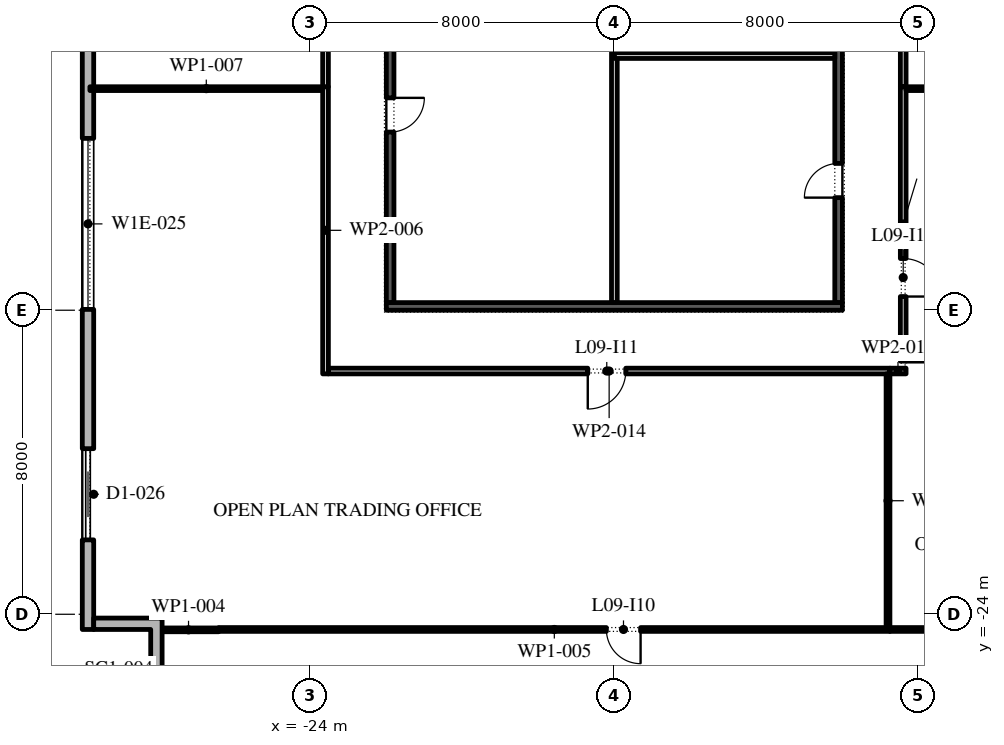
"""IFC4 building model, lengths in metres.
Left out: names, types, materials, properties, quantities, classifications, styles, units other than length and angle.
Written with IfcOpenShell. Run it as: python <this file> out.ifc"""

import sys

from ifc_helpers import new_model, si_unit, direction, frame, frame_2d, origin, place, context, subcontext, project, spatial, polyline, rectangle, outline, extrude, element, fill, save


model = new_model("IFC4")
c1 = context("Model", 3, precision=1e-05, world=origin(), true_north=direction((0.0, 1.0)))
c2 = subcontext(c1, "Body", "Model", "MODEL_VIEW")
j1 = project(units=[si_unit("LENGTHUNIT", "METRE"), si_unit("PLANEANGLEUNIT", "RADIAN")], contexts=[c1])
p1 = place(None, origin())
s1 = spatial("IfcSite", under=j1, at=p1, CompositionType="ELEMENT")
p2 = place(p1, origin())
s2 = spatial("IfcBuilding", under=s1, at=p2, CompositionType="ELEMENT")
p3 = place(p2, frame((0.0, 0.0, 48.0)))
s3 = spatial("IfcBuildingStorey", under=s2, at=p3, CompositionType="ELEMENT", Elevation=48.0)
p4 = place(p3, frame((-29.85, 25.1, 0.0), z_axis=(0.0, 0.0, 1.0), x_axis=(0.0, -1.0, 0.0)))
e1 = element("IfcWall", 1, at=p4, inside=s3, PredefinedType="STANDARD", context=c2, shape_type="SweptSolid", body=[
    extrude(rectangle(XDim=49.5, YDim=0.3, at=frame_2d((24.75, 0.0))), origin(), (0.0, 0.0, 1.0), 4.0),
])
p5 = place(p4, frame((1.157, 0.0, 0.45)))
e2 = element("IfcOpeningElement", 2, at=p5, cuts=e1, PredefinedType="OPENING", context=c2, shape_type="SweptSolid", body=[
    extrude(rectangle(XDim=4.5, YDim=2.875, at=frame_2d((2.25, 1.438))), frame((0.0, 0.16, 0.0), z_axis=(0.0, -1.0, 0.0), x_axis=(1.0, 0.0, 0.0)), (0.0, 0.0, 1.0), 0.32),
])
p6 = place(p4, frame((8.121, 0.0, 0.45)))
e3 = element("IfcOpeningElement", 3, at=p6, cuts=e1, PredefinedType="OPENING", context=c2, shape_type="SweptSolid", body=[
    extrude(rectangle(XDim=4.5, YDim=3.05, at=frame_2d((2.25, 1.525))), frame((0.0, 0.16, 0.0), z_axis=(0.0, -1.0, 0.0), x_axis=(1.0, 0.0, 0.0)), (0.0, 0.0, 1.0), 0.32),
])
p7 = place(p4, frame((16.286, 0.0, 0.0)))
e4 = element("IfcOpeningElement", 4, at=p7, cuts=e1, PredefinedType="OPENING", context=c2, shape_type="SweptSolid", body=[
    extrude(rectangle(XDim=2.4, YDim=3.325, at=frame_2d((1.2, 1.663))), frame((0.0, 0.16, 0.0), z_axis=(0.0, -1.0, 0.0), x_axis=(1.0, 0.0, 0.0)), (0.0, 0.0, 1.0), 0.32),
])
p8 = place(p4, frame((22.35, 0.0, 0.45)))
e5 = element("IfcOpeningElement", 5, at=p8, cuts=e1, PredefinedType="OPENING", context=c2, shape_type="SweptSolid", body=[
    extrude(rectangle(XDim=4.5, YDim=2.875, at=frame_2d((2.25, 1.438))), frame((0.0, 0.16, 0.0), z_axis=(0.0, -1.0, 0.0), x_axis=(1.0, 0.0, 0.0)), (0.0, 0.0, 1.0), 0.32),
])
p9 = place(p4, frame((29.464, 0.0, 0.45)))
e6 = element("IfcOpeningElement", 6, at=p9, cuts=e1, PredefinedType="OPENING", context=c2, shape_type="SweptSolid", body=[
    extrude(rectangle(XDim=4.5, YDim=2.875, at=frame_2d((2.25, 1.438))), frame((0.0, 0.16, 0.0), z_axis=(0.0, -1.0, 0.0), x_axis=(1.0, 0.0, 0.0)), (0.0, 0.0, 1.0), 0.32),
])
p10 = place(p4, frame((36.579, 0.0, 0.45)))
e7 = element("IfcOpeningElement", 7, at=p10, cuts=e1, PredefinedType="OPENING", context=c2, shape_type="SweptSolid", body=[
    extrude(rectangle(XDim=4.5, YDim=2.825, at=frame_2d((2.25, 1.413))), frame((0.0, 0.16, 0.0), z_axis=(0.0, -1.0, 0.0), x_axis=(1.0, 0.0, 0.0)), (0.0, 0.0, 1.0), 0.32),
])
p11 = place(p4, frame((44.743, 0.0, 0.0)))
e8 = element("IfcOpeningElement", 8, at=p11, cuts=e1, PredefinedType="OPENING", context=c2, shape_type="SweptSolid", body=[
    extrude(rectangle(XDim=2.4, YDim=3.5, at=frame_2d((1.2, 1.75))), frame((0.0, 0.16, 0.0), z_axis=(0.0, -1.0, 0.0), x_axis=(1.0, 0.0, 0.0)), (0.0, 0.0, 1.0), 0.32),
])
p12 = place(p3, origin())
e9 = element("IfcWall", 9, at=p12, inside=s3, PredefinedType="STANDARD", context=c2, shape_type="SweptSolid", body=[
    extrude(outline(polyline([(-26.4, -26.2), (-28.2, -26.2), (-28.2, -24.4), (-29.7, -24.4), (-29.7, -24.1), (-27.9, -24.1), (-27.9, -25.9), (-26.1, -25.9), (-26.1, -28.0), (-26.4, -28.0), (-26.4, -26.2)])), origin(), (0.0, 0.0, 1.0), 4.0),
])
p13 = place(p3, frame((-21.9, -15.8, 0.0), z_axis=(0.0, 0.0, 1.0), x_axis=(0.0, 1.0, 0.0)))
e10 = element("IfcWall", 10, at=p13, inside=s3, PredefinedType="SHEAR", context=c2, shape_type="SweptSolid", body=[
    extrude(rectangle(XDim=13.05, YDim=0.2, at=frame_2d((6.525, 0.0))), origin(), (0.0, 0.0, 1.0), 4.0),
])
p14 = place(p13, frame((4.488, 0.0, 0.0)))
e11 = element("IfcOpeningElement", 11, at=p14, cuts=e10, PredefinedType="OPENING", context=c2, shape_type="SweptSolid", body=[
    extrude(rectangle(XDim=0.9, YDim=2.1, at=frame_2d((0.45, 1.05))), frame((0.0, 0.11, 0.0), z_axis=(0.0, -1.0, 0.0), x_axis=(1.0, 0.0, 0.0)), (0.0, 0.0, 1.0), 0.22),
])
p15 = place(p13, frame((11.038, 0.0, 0.0)))
e12 = element("IfcOpeningElement", 12, at=p15, cuts=e10, PredefinedType="OPENING", context=c2, shape_type="SweptSolid", body=[
    extrude(rectangle(XDim=1.0, YDim=2.1, at=frame_2d((0.5, 1.05))), frame((0.0, 0.11, 0.0), z_axis=(0.0, -1.0, 0.0), x_axis=(1.0, 0.0, 0.0)), (0.0, 0.0, 1.0), 0.22),
])
p16 = place(p3, frame((-10.1, -15.8, 0.0), z_axis=(0.0, 0.0, 1.0), x_axis=(0.0, 1.0, 0.0)))
e13 = element("IfcWall", 13, at=p16, inside=s3, PredefinedType="SHEAR", context=c2, shape_type="SweptSolid", body=[
    extrude(rectangle(XDim=13.05, YDim=0.2, at=frame_2d((6.525, 0.0))), origin(), (0.0, 0.0, 1.0), 4.0),
])
p17 = place(p16, frame((2.762, 0.0, 0.0)))
e14 = element("IfcOpeningElement", 14, at=p17, cuts=e13, PredefinedType="OPENING", context=c2, shape_type="SweptSolid", body=[
    extrude(rectangle(XDim=0.9, YDim=2.1, at=frame_2d((0.45, 1.05))), frame((0.0, 0.11, 0.0), z_axis=(0.0, -1.0, 0.0), x_axis=(1.0, 0.0, 0.0)), (0.0, 0.0, 1.0), 0.22),
])
p18 = place(p16, frame((9.363, 0.0, 0.0)))
e15 = element("IfcOpeningElement", 15, at=p18, cuts=e13, PredefinedType="OPENING", context=c2, shape_type="SweptSolid", body=[
    extrude(rectangle(XDim=0.9, YDim=2.1, at=frame_2d((0.45, 1.05))), frame((0.0, 0.11, 0.0), z_axis=(0.0, -1.0, 0.0), x_axis=(1.0, 0.0, 0.0)), (0.0, 0.0, 1.0), 0.22),
])
p19 = place(p3, frame((-22.0, -15.9, 0.0), z_axis=(0.0, 0.0, 1.0), x_axis=(1.0, 0.0, 0.0)))
e16 = element("IfcWall", 16, at=p19, inside=s3, PredefinedType="SHEAR", context=c2, shape_type="SweptSolid", body=[
    extrude(rectangle(XDim=12.0, YDim=0.2, at=frame_2d((6.0, 0.0))), origin(), (0.0, 0.0, 1.0), 4.0),
])
p20 = place(p3, frame((-16.0, -15.8, 0.0), z_axis=(0.0, 0.0, 1.0), x_axis=(0.0, 1.0, 0.0)))
e17 = element("IfcWall", 17, at=p20, inside=s3, PredefinedType="PARTITIONING", context=c2, shape_type="SweptSolid", body=[
    extrude(rectangle(XDim=13.05, YDim=0.15, at=frame_2d((6.525, 0.0))), origin(), (0.0, 0.0, 1.0), 4.0),
])
p21 = place(p20, frame((11.087, 0.0, 0.0)))
e18 = element("IfcOpeningElement", 18, at=p21, cuts=e17, PredefinedType="OPENING", context=c2, shape_type="SweptSolid", body=[
    extrude(rectangle(XDim=0.9, YDim=2.1, at=frame_2d((0.45, 1.05))), frame((0.0, 0.085, 0.0), z_axis=(0.0, -1.0, 0.0), x_axis=(1.0, 0.0, 0.0)), (0.0, 0.0, 1.0), 0.17),
])
p22 = place(p3, frame((-16.0, -9.3, 0.0), z_axis=(0.0, 0.0, 1.0), x_axis=(1.0, 0.0, 0.0)))
e19 = element("IfcWall", 19, at=p22, inside=s3, PredefinedType="PARTITIONING", context=c2, shape_type="SweptSolid", body=[
    extrude(rectangle(XDim=5.8, YDim=0.15, at=frame_2d((2.9, 0.0))), origin(), (0.0, 0.0, 1.0), 4.0),
])
p23 = place(p3, frame((-28.0, -24.41, 0.0), z_axis=(0.0, 0.0, 1.0), x_axis=(1.0, 0.0, 0.0)))
e20 = element("IfcWall", 20, at=p23, inside=s3, PredefinedType="PARTITIONING", context=c2, shape_type="SweptSolid", body=[
    extrude(rectangle(XDim=1.59, YDim=0.1, at=frame_2d((0.795, 0.0))), origin(), (0.0, 0.0, 1.0), 4.0),
])
p24 = place(p3, frame((-26.41, -24.4, 0.0), z_axis=(0.0, 0.0, 1.0), x_axis=(1.0, 0.0, 0.0)))
e21 = element("IfcWall", 21, at=p24, inside=s3, PredefinedType="PARTITIONING", context=c2, shape_type="SweptSolid", body=[
    extrude(rectangle(XDim=17.66, YDim=0.1, at=frame_2d((8.83, 0.0))), origin(), (0.0, 0.0, 1.0), 4.0),
])
p25 = place(p24, frame((10.2, 0.0, 0.0)))
e22 = element("IfcOpeningElement", 22, at=p25, cuts=e21, PredefinedType="OPENING", context=c2, shape_type="SweptSolid", body=[
    extrude(rectangle(XDim=0.9, YDim=2.1, at=frame_2d((0.45, 1.05))), frame((0.0, 0.06, 0.0), z_axis=(0.0, -1.0, 0.0), x_axis=(1.0, 0.0, 0.0)), (0.0, 0.0, 1.0), 0.12),
])
p26 = place(p3, frame((-23.6, -17.675, 0.0), z_axis=(0.0, 0.0, 1.0), x_axis=(0.0, 1.0, 0.0)))
e23 = element("IfcWall", 23, at=p26, inside=s3, PredefinedType="PARTITIONING", context=c2, shape_type="SweptSolid", body=[
    extrude(rectangle(XDim=7.555, YDim=0.15, at=frame_2d((3.777, 0.0))), origin(), (0.0, 0.0, 1.0), 4.0),
])
p27 = place(p3, frame((-23.675, -10.17, 0.0), z_axis=(0.0, 0.0, 1.0), x_axis=(-1.0, 0.0, 0.0)))
e24 = element("IfcWall", 24, at=p27, inside=s3, PredefinedType="PARTITIONING", context=c2, shape_type="SweptSolid", body=[
    extrude(rectangle(XDim=6.125, YDim=0.1, at=frame_2d((3.062, 0.0))), origin(), (0.0, 0.0, 1.0), 4.0),
])
p28 = place(p3, frame((-23.6, -10.12, 0.0), z_axis=(0.0, 0.0, 1.0), x_axis=(0.0, 1.0, 0.0)))
e25 = element("IfcWall", 25, at=p28, inside=s3, PredefinedType="PARTITIONING", context=c2, shape_type="SweptSolid", body=[
    extrude(rectangle(XDim=7.01, YDim=0.15, at=frame_2d((3.505, 0.0))), origin(), (0.0, 0.0, 1.0), 4.0),
])
p29 = place(p28, frame((2.41, 0.0, 0.0)))
e26 = element("IfcOpeningElement", 26, at=p29, cuts=e25, PredefinedType="OPENING", context=c2, shape_type="SweptSolid", body=[
    extrude(rectangle(XDim=1.0, YDim=2.1, at=frame_2d((0.5, 1.05))), frame((0.0, 0.085, 0.0), z_axis=(0.0, -1.0, 0.0), x_axis=(1.0, 0.0, 0.0)), (0.0, 0.0, 1.0), 0.17),
])
p30 = place(p3, frame((-8.75, -24.4, 0.0), z_axis=(0.0, 0.0, 1.0), x_axis=(1.0, 0.0, 0.0)))
e27 = element("IfcWall", 27, at=p30, inside=s3, PredefinedType="PARTITIONING", context=c2, shape_type="SweptSolid", body=[
    extrude(rectangle(XDim=10.2, YDim=0.1, at=frame_2d((5.1, 0.0))), origin(), (0.0, 0.0, 1.0), 4.0),
])
p31 = place(p3, frame((-8.75, -17.6, 0.0), z_axis=(0.0, 0.0, 1.0), x_axis=(-1.0, 0.0, 0.0)))
e28 = element("IfcWall", 28, at=p31, inside=s3, PredefinedType="PARTITIONING", context=c2, shape_type="SweptSolid", body=[
    extrude(rectangle(XDim=14.775, YDim=0.15, at=frame_2d((7.387, 0.0))), origin(), (0.0, 0.0, 1.0), 4.0),
])
p32 = place(p31, frame((6.95, 0.0, 0.0)))
e29 = element("IfcOpeningElement", 29, at=p32, cuts=e28, PredefinedType="OPENING", context=c2, shape_type="SweptSolid", body=[
    extrude(rectangle(XDim=1.0, YDim=2.1, at=frame_2d((0.5, 1.05))), frame((0.0, 0.085, 0.0), z_axis=(0.0, -1.0, 0.0), x_axis=(1.0, 0.0, 0.0)), (0.0, 0.0, 1.0), 0.17),
])
p33 = place(p3, frame((-8.8, -17.675, 0.0), z_axis=(0.0, 0.0, 1.0), x_axis=(0.0, -1.0, 0.0)))
e30 = element("IfcWall", 30, at=p33, inside=s3, PredefinedType="PARTITIONING", context=c2, shape_type="SweptSolid", body=[
    extrude(rectangle(XDim=6.675, YDim=0.1, at=frame_2d((3.337, 0.0))), origin(), (0.0, 0.0, 1.0), 4.0),
])
p34 = place(p3, frame((-8.325, -17.6, 0.0), z_axis=(0.0, 0.0, 1.0), x_axis=(-1.0, 0.0, 0.0)))
e31 = element("IfcWall", 31, at=p34, inside=s3, PredefinedType="PARTITIONING", context=c2, shape_type="SweptSolid", body=[
    extrude(rectangle(XDim=0.425, YDim=0.15, at=frame_2d((0.212, 0.0))), origin(), (0.0, 0.0, 1.0), 4.0),
])
p35 = place(p3, frame((-8.4, -10.12, 0.0), z_axis=(0.0, 0.0, 1.0), x_axis=(0.0, -1.0, 0.0)))
e32 = element("IfcWall", 32, at=p35, inside=s3, PredefinedType="PARTITIONING", context=c2, shape_type="SweptSolid", body=[
    extrude(rectangle(XDim=7.22, YDim=0.15, at=frame_2d((3.61, 0.0))), origin(), (0.0, 0.0, 1.0), 4.0),
])
p36 = place(p35, frame((4.52, 0.0, 0.0)))
e33 = element("IfcOpeningElement", 33, at=p36, cuts=e32, PredefinedType="OPENING", context=c2, shape_type="SweptSolid", body=[
    extrude(rectangle(XDim=1.0, YDim=2.1, at=frame_2d((0.5, 1.05))), frame((0.0, 0.085, 0.0), z_axis=(0.0, -1.0, 0.0), x_axis=(1.0, 0.0, 0.0)), (0.0, 0.0, 1.0), 0.17),
])
p37 = place(p3, frame((-8.4, -4.925, 0.0), z_axis=(0.0, 0.0, 1.0), x_axis=(0.0, -1.0, 0.0)))
e34 = element("IfcWall", 34, at=p37, inside=s3, PredefinedType="PARTITIONING", context=c2, shape_type="SweptSolid", body=[
    extrude(rectangle(XDim=5.195, YDim=0.15, at=frame_2d((2.598, 0.0))), origin(), (0.0, 0.0, 1.0), 4.0),
])
p38 = place(p3, frame((1.55, -17.29, 0.0), z_axis=(0.0, 0.0, 1.0), x_axis=(-1.0, 0.0, 0.0)))
e35 = element("IfcWall", 35, at=p38, inside=s3, PredefinedType="PARTITIONING", context=c2, shape_type="SweptSolid", body=[
    extrude(rectangle(XDim=9.875, YDim=0.1, at=frame_2d((4.938, 0.0))), origin(), (0.0, 0.0, 1.0), 4.0),
])
p39 = place(p38, frame((5.6, 0.0, 0.0)))
e36 = element("IfcOpeningElement", 36, at=p39, cuts=e35, PredefinedType="OPENING", context=c2, shape_type="SweptSolid", body=[
    extrude(rectangle(XDim=0.9, YDim=2.1, at=frame_2d((0.45, 1.05))), frame((0.0, 0.06, 0.0), z_axis=(0.0, -1.0, 0.0), x_axis=(1.0, 0.0, 0.0)), (0.0, 0.0, 1.0), 0.12),
])
p40 = place(p3, frame((8.325, -10.17, 0.0), z_axis=(0.0, 0.0, 1.0), x_axis=(-1.0, 0.0, 0.0)))
e37 = element("IfcWall", 37, at=p40, inside=s3, PredefinedType="PARTITIONING", context=c2, shape_type="SweptSolid", body=[
    extrude(rectangle(XDim=16.65, YDim=0.1, at=frame_2d((8.325, 0.0))), origin(), (0.0, 0.0, 1.0), 4.0),
])
p41 = place(p10, origin())
e38 = element("IfcWindow", 38, at=p41, inside=s3, PartitioningType="DOUBLE_PANEL_VERTICAL", PredefinedType="WINDOW", context=c2, shape_type="SweptSolid", body=[
    extrude(rectangle(XDim=4.5, YDim=2.825, at=frame_2d((2.25, 1.413))), frame((0.0, 0.03, 0.0), z_axis=(0.0, -1.0, 0.0), x_axis=(1.0, 0.0, 0.0)), (0.0, 0.0, 1.0), 0.06),
])
fill(e7, e38)
p42 = place(p11, origin())
e39 = element("IfcDoor", 39, at=p42, inside=s3, OperationType="DOUBLE_DOOR_SLIDING", PredefinedType="DOOR", context=c2, shape_type="SweptSolid", body=[
    extrude(rectangle(XDim=2.4, YDim=3.5, at=frame_2d((1.2, 1.75))), frame((0.0, 0.025, 0.0), z_axis=(0.0, -1.0, 0.0), x_axis=(1.0, 0.0, 0.0)), (0.0, 0.0, 1.0), 0.05),
])
fill(e8, e39)
p43 = place(p14, frame((0.9, -0.15, 0.0), z_axis=(0.0, 0.0, 1.0), x_axis=(-1.0, 0.0, 0.0)))
e40 = element("IfcDoor", 40, at=p43, inside=s3, OperationType="SINGLE_SWING_RIGHT", PredefinedType="DOOR", context=c2, shape_type="SweptSolid", body=[
    extrude(rectangle(XDim=0.9, YDim=2.1, at=frame_2d((0.45, 1.05))), frame((0.0, -0.05, 0.0), z_axis=(0.0, -1.0, 0.0), x_axis=(1.0, 0.0, 0.0)), (0.0, 0.0, 1.0), 0.05),
])
fill(e11, e40)
p44 = place(p17, origin())
e41 = element("IfcDoor", 41, at=p44, inside=s3, OperationType="SINGLE_SWING_RIGHT", PredefinedType="DOOR", context=c2, shape_type="SweptSolid", body=[
    extrude(rectangle(XDim=0.9, YDim=2.1, at=frame_2d((0.45, 1.05))), frame((0.0, 0.1, 0.0), z_axis=(0.0, -1.0, 0.0), x_axis=(1.0, 0.0, 0.0)), (0.0, 0.0, 1.0), 0.05),
])
fill(e14, e41)
p45 = place(p25, frame((0.9, 0.0, 0.0), z_axis=(0.0, 0.0, 1.0), x_axis=(-1.0, 0.0, 0.0)))
e42 = element("IfcDoor", 42, at=p45, inside=s3, OperationType="SINGLE_SWING_RIGHT", PredefinedType="DOOR", context=c2, shape_type="SweptSolid", body=[
    extrude(rectangle(XDim=0.9, YDim=2.1, at=frame_2d((0.45, 1.05))), frame((0.0, 0.025, 0.0), z_axis=(0.0, -1.0, 0.0), x_axis=(1.0, 0.0, 0.0)), (0.0, 0.0, 1.0), 0.05),
])
fill(e22, e42)
p46 = place(p32, origin())
e43 = element("IfcDoor", 43, at=p46, inside=s3, OperationType="SINGLE_SWING_LEFT", PredefinedType="DOOR", context=c2, shape_type="SweptSolid", body=[
    extrude(rectangle(XDim=1.0, YDim=2.1, at=frame_2d((0.5, 1.05))), frame((0.0, 0.025, 0.0), z_axis=(0.0, -1.0, 0.0), x_axis=(1.0, 0.0, 0.0)), (0.0, 0.0, 1.0), 0.05),
])
fill(e29, e43)
p47 = place(p36, origin())
e44 = element("IfcDoor", 44, at=p47, inside=s3, OperationType="SINGLE_SWING_LEFT", PredefinedType="DOOR", context=c2, shape_type="SweptSolid", body=[
    extrude(rectangle(XDim=1.0, YDim=2.1, at=frame_2d((0.5, 1.05))), frame((0.0, 0.025, 0.0), z_axis=(0.0, -1.0, 0.0), x_axis=(1.0, 0.0, 0.0)), (0.0, 0.0, 1.0), 0.05),
])
fill(e33, e44)
save(model, sys.argv[1])
